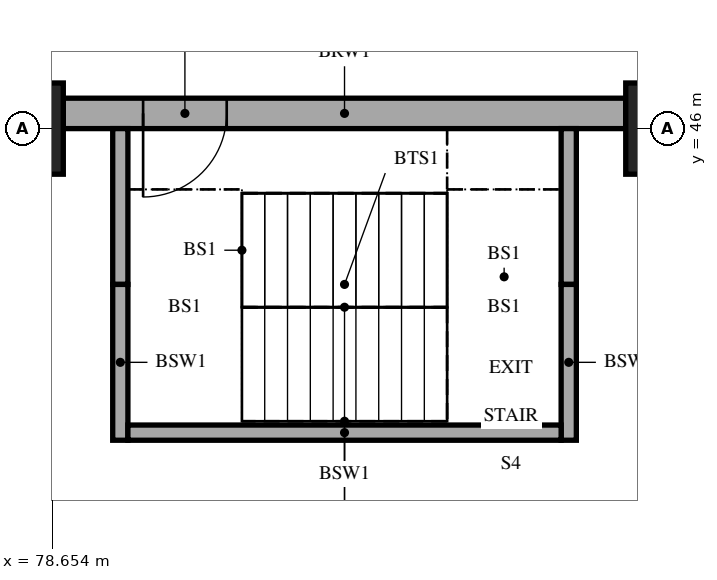
"""IFC4 building model, lengths in metres.
Left out: names, types, materials, properties, quantities, classifications, styles, units other than length and angle.
Written with IfcOpenShell. Run it as: python <this file> out.ifc"""

import sys

from ifc_helpers import new_model, si_unit, direction, frame, frame_2d, origin, origin_2d, place, context, subcontext, project, spatial, rectangle, extrude, element, fill, save


model = new_model("IFC4")
c1 = context("Model", 3, precision=1e-05, world=origin(), true_north=direction((0.0, 1.0)))
c2 = subcontext(c1, "Body", "Model", "MODEL_VIEW")
j1 = project(units=[si_unit("LENGTHUNIT", "METRE"), si_unit("PLANEANGLEUNIT", "RADIAN")], contexts=[c1])
p1 = place(None, origin())
s1 = spatial("IfcSite", under=j1, at=p1, CompositionType="ELEMENT")
p2 = place(p1, origin())
s2 = spatial("IfcBuilding", under=s1, at=p2, CompositionType="ELEMENT")
p3 = place(p2, frame((0.0, 0.0, -8.4)))
s3 = spatial("IfcBuildingStorey", under=s2, at=p3, CompositionType="ELEMENT", Elevation=-8.4)
for number, where, z_axis, x_axis in (
    (1, (78.0, 46.0, 0.0), (0.0, 0.0, 1.0), (1.0, 0.0, 0.0)),
    (2, (87.0, 46.0, 0.0), (0.0, 0.0, 1.0), (1.0, 0.0, 0.0)),
):
    element("IfcColumn", number, at=place(p3, frame(where, z_axis=z_axis, x_axis=x_axis)), inside=s3, PredefinedType="COLUMN", context=c2, shape_type="SweptSolid", body=[
        extrude(rectangle(XDim=1.6, YDim=1.2, at=origin_2d()), origin(), (0.0, 0.0, 1.0), 4.2),
    ])
p4 = place(p3, frame((78.8, 46.2, 0.0), z_axis=(0.0, 0.0, 1.0), x_axis=(1.0, 0.0, 0.0)))
e3 = element("IfcWall", 3, at=p4, inside=s3, PredefinedType="SOLIDWALL", context=c2, shape_type="SweptSolid", body=[
    extrude(rectangle(XDim=7.4, YDim=0.4, at=frame_2d((3.7, 0.0))), origin(), (0.0, 0.0, 1.0), 4.2),
])
p5 = place(p4, frame((1.05, 0.0, 0.0)))
e4 = element("IfcOpeningElement", 4, at=p5, cuts=e3, PredefinedType="OPENING", context=c2, shape_type="SweptSolid", body=[
    extrude(rectangle(XDim=1.1, YDim=2.1, at=frame_2d((0.55, 1.05))), frame((0.0, 0.21, 0.0), z_axis=(0.0, -1.0, 0.0), x_axis=(1.0, 0.0, 0.0)), (0.0, 0.0, 1.0), 0.42),
])
for number, where, z_axis, x_axis in (
    (5, (79.55, 46.0, 0.0), (0.0, 0.0, 1.0), (0.0, -1.0, 0.0)),
    (6, (79.55, 43.95, 0.0), (0.0, 0.0, 1.0), (0.0, -1.0, 0.0)),
    (7, (85.45, 46.0, 0.0), (0.0, 0.0, 1.0), (0.0, -1.0, 0.0)),
    (8, (85.45, 43.95, 0.0), (0.0, 0.0, 1.0), (0.0, -1.0, 0.0)),
):
    element("IfcWall", number, at=place(p3, frame(where, z_axis=z_axis, x_axis=x_axis)), inside=s3, PredefinedType="SOLIDWALL", context=c2, shape_type="SweptSolid", body=[
        extrude(rectangle(XDim=2.05, YDim=0.2, at=frame_2d((1.025, 0.0))), origin(), (0.0, 0.0, 1.0), 4.2),
    ])
p6 = place(p3, frame((79.65, 42.0, 0.0), z_axis=(0.0, 0.0, 1.0), x_axis=(1.0, 0.0, 0.0)))
e9 = element("IfcWall", 9, at=p6, inside=s3, PredefinedType="SOLIDWALL", context=c2, shape_type="SweptSolid", body=[
    extrude(rectangle(XDim=5.7, YDim=0.2, at=frame_2d((2.85, 0.0))), origin(), (0.0, 0.0, 1.0), 4.2),
])
p7 = place(p5, frame((1.1, 0.0, 0.0), z_axis=(0.0, 0.0, 1.0), x_axis=(-1.0, 0.0, 0.0)))
e10 = element("IfcDoor", 10, at=p7, inside=s3, OperationType="SINGLE_SWING_RIGHT", PredefinedType="DOOR", context=c2, shape_type="SweptSolid", body=[
    extrude(rectangle(XDim=1.1, YDim=2.1, at=frame_2d((0.55, 1.05))), frame((0.0, 0.025, 0.0), z_axis=(0.0, -1.0, 0.0), x_axis=(1.0, 0.0, 0.0)), (0.0, 0.0, 1.0), 0.05),
])
fill(e4, e10)
save(model, sys.argv[1])
